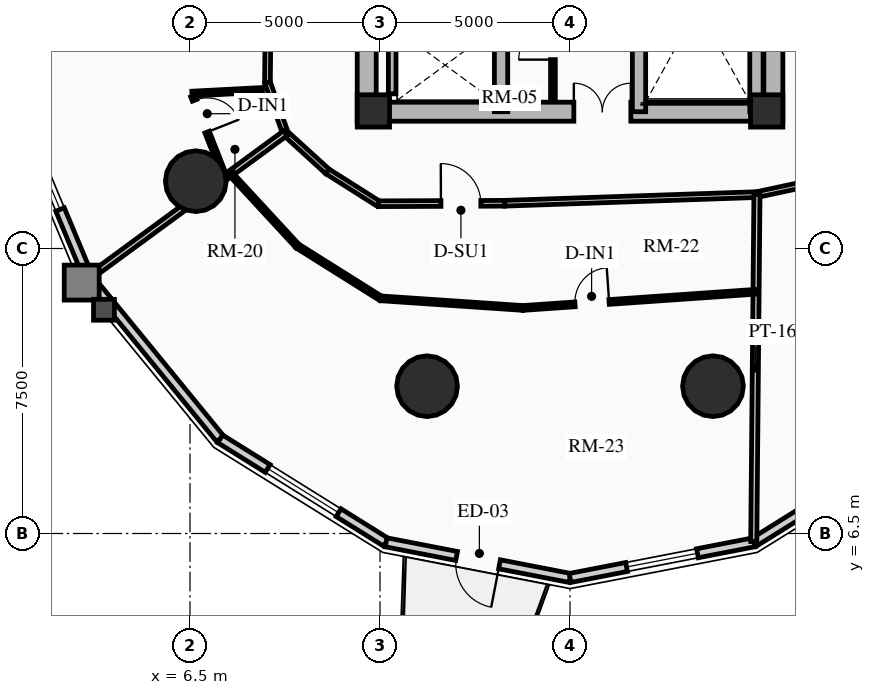
"""IFC4 building model, lengths in metres.
Left out: names, types, materials, properties, quantities, classifications, styles, units other than length and angle.
Written with IfcOpenShell. Run it as: python <this file> out.ifc"""

import sys

from ifc_helpers import new_model, si_unit, direction, frame, frame_2d, origin, origin_2d, place, context, subcontext, project, spatial, rectangle, circle, extrude, source, transform, mapped, element, fill, save


model = new_model("IFC4")
c1 = context("Model", 3, precision=1e-05, world=origin(), true_north=direction((0.0, 1.0)))
c2 = subcontext(c1, "Body", "Model", "MODEL_VIEW")
j1 = project(units=[si_unit("LENGTHUNIT", "METRE"), si_unit("PLANEANGLEUNIT", "RADIAN")], contexts=[c1])
p1 = place(None, origin())
s1 = spatial("IfcSite", under=j1, at=p1, CompositionType="ELEMENT")
p2 = place(p1, origin())
s2 = spatial("IfcBuilding", under=s1, at=p2, CompositionType="ELEMENT")
p3 = place(p2, frame((0.0, 0.0, 48.19)))
s3 = spatial("IfcBuildingStorey", under=s2, at=p3, CompositionType="ELEMENT", Elevation=48.19)
for number, where, z_axis, x_axis in (
    (1, (11.15, 17.35, 0.0), (0.0, 0.0, 1.0), (0.0, 1.0, 0.0)),
    (2, (21.85, 17.35, 0.0), (0.0, 0.0, 1.0), (0.0, 1.0, 0.0)),
):
    element("IfcWall", number, at=place(p3, frame(where, z_axis=z_axis, x_axis=x_axis)), inside=s3, PredefinedType="SHEAR", context=c2, shape_type="SweptSolid", body=[
        extrude(rectangle(XDim=14.3, YDim=0.5, at=frame_2d((7.15, 0.0))), origin(), (0.0, 0.0, 1.0), 2.91),
    ])
p4 = place(p3, frame((11.15, 17.6, 0.0), z_axis=(0.0, 0.0, 1.0), x_axis=(1.0, 0.0, 0.0)))
e3 = element("IfcWall", 3, at=p4, inside=s3, PredefinedType="SHEAR", context=c2, shape_type="SweptSolid", body=[
    extrude(rectangle(XDim=10.7, YDim=0.5, at=frame_2d((5.35, 0.0))), origin(), (0.0, 0.0, 1.0), 2.91),
])
m1 = source(origin(), c2, "Body", "SweptSolid", [
    extrude(rectangle(XDim=1.5, YDim=2.02, at=frame_2d((0.75, 1.01))), frame((0.0, 0.26, 0.0), z_axis=(0.0, -1.0, 0.0), x_axis=(1.0, 0.0, 0.0)), (0.0, 0.0, 1.0), 0.52),
])
p5 = place(p4, frame((5.45, 0.0, 0.0)))
e4 = element("IfcOpeningElement", 4, at=p5, cuts=e3, PredefinedType="OPENING", context=c2, shape_type="MappedRepresentation", body=[
    mapped(m1, transform((0.0, 0.0, 0.0), x_axis=(1.0, 0.0, 0.0), y_axis=(0.0, 1.0, 0.0), z_axis=(0.0, 0.0, 1.0), scale=1.0)),
])
p6 = place(p3, frame((14.685, 17.6, 0.0), z_axis=(0.0, 0.0, 1.0), x_axis=(0.0, 1.0, 0.0)))
e5 = element("IfcWall", 5, at=p6, inside=s3, PredefinedType="SHEAR", context=c2, shape_type="SweptSolid", body=[
    extrude(rectangle(XDim=13.8, YDim=0.35, at=frame_2d((6.9, 0.0))), origin(), (0.0, 0.0, 1.0), 2.91),
])
m2 = source(origin(), c2, "Body", "SweptSolid", [
    extrude(rectangle(XDim=1.1, YDim=2.015, at=frame_2d((0.55, 1.007))), frame((0.0, 0.185, 0.0), z_axis=(0.0, -1.0, 0.0), x_axis=(1.0, 0.0, 0.0)), (0.0, 0.0, 1.0), 0.37),
])
p7 = place(p6, frame((4.9, 0.0, 0.0)))
e6 = element("IfcOpeningElement", 6, at=p7, cuts=e5, PredefinedType="OPENING", context=c2, shape_type="MappedRepresentation", body=[
    mapped(m2, transform((0.0, 0.0, 0.0), x_axis=(1.0, 0.0, 0.0), y_axis=(0.0, 1.0, 0.0), z_axis=(0.0, 0.0, 1.0), scale=1.0)),
])
m3 = source(origin(), c2, "Body", "SweptSolid", [
    extrude(rectangle(XDim=1.15, YDim=2.02, at=frame_2d((0.575, 1.01))), frame((0.0, 0.185, 0.0), z_axis=(0.0, -1.0, 0.0), x_axis=(1.0, 0.0, 0.0)), (0.0, 0.0, 1.0), 0.37),
])
p8 = place(p6, frame((7.32, 0.0, 0.0)))
e7 = element("IfcOpeningElement", 7, at=p8, cuts=e5, PredefinedType="OPENING", context=c2, shape_type="MappedRepresentation", body=[
    mapped(m3, transform((0.0, 0.0, 0.0), x_axis=(1.0, 0.0, 0.0), y_axis=(0.0, 1.0, 0.0), z_axis=(0.0, 0.0, 1.0), scale=1.0)),
])
p9 = place(p3, frame((18.315, 17.6, 0.0), z_axis=(0.0, 0.0, 1.0), x_axis=(0.0, 1.0, 0.0)))
e8 = element("IfcWall", 8, at=p9, inside=s3, PredefinedType="SHEAR", context=c2, shape_type="SweptSolid", body=[
    extrude(rectangle(XDim=13.8, YDim=0.35, at=frame_2d((6.9, 0.0))), origin(), (0.0, 0.0, 1.0), 2.91),
])
p10 = place(p9, frame((10.025, 0.0, 0.0)))
e9 = element("IfcOpeningElement", 9, at=p10, cuts=e8, PredefinedType="OPENING", context=c2, shape_type="MappedRepresentation", body=[
    mapped(m2, transform((0.0, 0.0, 0.0), x_axis=(1.0, 0.0, 0.0), y_axis=(0.0, 1.0, 0.0), z_axis=(0.0, 0.0, 1.0), scale=1.0)),
])
p11 = place(p9, frame((12.025, 0.0, 0.0)))
e10 = element("IfcOpeningElement", 10, at=p11, cuts=e8, PredefinedType="OPENING", context=c2, shape_type="MappedRepresentation", body=[
    mapped(m2, transform((0.0, 0.0, 0.0), x_axis=(1.0, 0.0, 0.0), y_axis=(0.0, 1.0, 0.0), z_axis=(0.0, 0.0, 1.0), scale=1.0)),
])
p12 = place(p9, frame((5.33, 0.0, 0.0)))
e11 = element("IfcOpeningElement", 11, at=p12, cuts=e8, PredefinedType="OPENING", context=c2, shape_type="MappedRepresentation", body=[
    mapped(m3, transform((0.0, 0.0, 0.0), x_axis=(1.0, 0.0, 0.0), y_axis=(0.0, 1.0, 0.0), z_axis=(0.0, 0.0, 1.0), scale=1.0)),
])
p13 = place(p3, frame((21.405, 17.6, 0.0), z_axis=(0.0, 0.0, 1.0), x_axis=(0.0, 1.0, 0.0)))
e12 = element("IfcWall", 12, at=p13, inside=s3, PredefinedType="SHEAR", context=c2, shape_type="SweptSolid", body=[
    extrude(rectangle(XDim=6.745, YDim=0.35, at=frame_2d((3.373, 0.0))), origin(), (0.0, 0.0, 1.0), 2.91),
])
for number, where, z_axis, x_axis in (
    (13, (11.325, 17.62, 0.0), (0.0, 0.0, 1.0), (1.0, 0.0, 0.0)),
    (14, (21.675, 17.62, 0.0), (0.0, 0.0, 1.0), (1.0, 0.0, 0.0)),
):
    element("IfcColumn", number, at=place(p3, frame(where, z_axis=z_axis, x_axis=x_axis)), inside=s3, PredefinedType="COLUMN", context=c2, shape_type="SweptSolid", body=[
        extrude(rectangle(XDim=0.85, YDim=0.85, at=origin_2d()), origin(), (0.0, 0.0, 1.0), 2.91),
    ])
for number, where, z_axis, x_axis in (
    (15, (6.653, 15.771, 0.0), (0.0, 0.0, 1.0), (1.0, 0.0, 0.0)),
    (16, (12.739, 10.377, 0.0), (0.0, 0.0, 1.0), (1.0, 0.0, 0.0)),
    (17, (20.261, 10.377, 0.0), (0.0, 0.0, 1.0), (1.0, 0.0, 0.0)),
):
    element("IfcColumn", number, at=place(p3, frame(where, z_axis=z_axis, x_axis=x_axis)), inside=s3, PredefinedType="USERDEFINED", context=c2, shape_type="SweptSolid", body=[
        extrude(circle(Radius=0.8, at=origin_2d()), origin(), (0.0, 0.0, 1.0), 2.91),
    ])
p14 = place(p3, frame((3.828, 13.232, 0.0), z_axis=(0.0, 0.0, 1.0), x_axis=(-0.384348836956, 0.923187939442, 0.0)))
e18 = element("IfcWall", 18, at=p14, inside=s3, PredefinedType="SOLIDWALL", context=c2, shape_type="SweptSolid", body=[
    extrude(rectangle(XDim=5.789, YDim=0.24, at=frame_2d((2.894, 0.0))), origin(), (0.0, 0.0, 1.0), 2.073),
])
m4 = source(origin(), c2, "Body", "SweptSolid", [
    extrude(rectangle(XDim=1.9, YDim=1.35, at=frame_2d((0.95, 0.675))), frame((0.0, 0.13, 0.0), z_axis=(0.0, -1.0, 0.0), x_axis=(1.0, 0.0, 0.0)), (0.0, 0.0, 1.0), 0.26),
])
p15 = place(p14, frame((1.944, 0.0, 0.65)))
e19 = element("IfcOpeningElement", 19, at=p15, cuts=e18, PredefinedType="OPENING", context=c2, shape_type="MappedRepresentation", body=[
    mapped(m4, transform((0.0, 0.0, 0.0), x_axis=(1.0, 0.0, 0.0), y_axis=(0.0, 1.0, 0.0), z_axis=(0.0, 0.0, 1.0), scale=1.0)),
])
p16 = place(p3, frame((7.293, 8.991, 0.0), z_axis=(0.0, 0.0, 1.0), x_axis=(-0.632713287022, 0.77438614168, 0.0)))
e20 = element("IfcWall", 20, at=p16, inside=s3, PredefinedType="SOLIDWALL", context=c2, shape_type="SweptSolid", body=[
    extrude(rectangle(XDim=5.477, YDim=0.24, at=frame_2d((2.738, 0.0))), origin(), (0.0, 0.0, 1.0), 2.073),
])
p17 = place(p3, frame((11.66, 6.268, 0.0), z_axis=(0.0, 0.0, 1.0), x_axis=(-0.848533613342, 0.529141481107, 0.0)))
e21 = element("IfcWall", 21, at=p17, inside=s3, PredefinedType="SOLIDWALL", context=c2, shape_type="SweptSolid", body=[
    extrude(rectangle(XDim=5.146, YDim=0.24, at=frame_2d((2.573, 0.0))), origin(), (0.0, 0.0, 1.0), 2.073),
])
m5 = source(origin(), c2, "Body", "SweptSolid", [
    extrude(rectangle(XDim=2.2, YDim=1.35, at=frame_2d((1.1, 0.675))), frame((0.0, 0.13, 0.0), z_axis=(0.0, -1.0, 0.0), x_axis=(1.0, 0.0, 0.0)), (0.0, 0.0, 1.0), 0.26),
])
p18 = place(p17, frame((1.473, 0.0, 0.65)))
e22 = element("IfcOpeningElement", 22, at=p18, cuts=e21, PredefinedType="OPENING", context=c2, shape_type="MappedRepresentation", body=[
    mapped(m5, transform((0.0, 0.0, 0.0), x_axis=(1.0, 0.0, 0.0), y_axis=(0.0, 1.0, 0.0), z_axis=(0.0, 0.0, 1.0), scale=1.0)),
])
p19 = place(p3, frame((16.5, 5.33, 0.0), z_axis=(0.0, 0.0, 1.0), x_axis=(-0.981725274071, 0.190303668512, 0.0)))
e23 = element("IfcWall", 23, at=p19, inside=s3, PredefinedType="SOLIDWALL", context=c2, shape_type="SweptSolid", body=[
    extrude(rectangle(XDim=4.93, YDim=0.24, at=frame_2d((2.465, 0.0))), origin(), (0.0, 0.0, 1.0), 2.073),
])
m6 = source(origin(), c2, "Body", "SweptSolid", [
    extrude(rectangle(XDim=1.15, YDim=2.005, at=frame_2d((0.575, 1.002))), frame((0.0, 0.13, 0.0), z_axis=(0.0, -1.0, 0.0), x_axis=(1.0, 0.0, 0.0)), (0.0, 0.0, 1.0), 0.26),
])
p20 = place(p19, frame((1.89, 0.0, 0.0)))
e24 = element("IfcOpeningElement", 24, at=p20, cuts=e23, PredefinedType="OPENING", context=c2, shape_type="MappedRepresentation", body=[
    mapped(m6, transform((0.0, 0.0, 0.0), x_axis=(1.0, 0.0, 0.0), y_axis=(0.0, 1.0, 0.0), z_axis=(0.0, 0.0, 1.0), scale=1.0)),
])
p21 = place(p3, frame((21.34, 6.268, 0.0), z_axis=(0.0, 0.0, 1.0), x_axis=(-0.981725274071, -0.190303668512, 0.0)))
e25 = element("IfcWall", 25, at=p21, inside=s3, PredefinedType="SOLIDWALL", context=c2, shape_type="SweptSolid", body=[
    extrude(rectangle(XDim=4.93, YDim=0.24, at=frame_2d((2.465, 0.0))), origin(), (0.0, 0.0, 1.0), 2.073),
])
p22 = place(p21, frame((1.515, 0.0, 0.65)))
e26 = element("IfcOpeningElement", 26, at=p22, cuts=e25, PredefinedType="OPENING", context=c2, shape_type="MappedRepresentation", body=[
    mapped(m4, transform((0.0, 0.0, 0.0), x_axis=(1.0, 0.0, 0.0), y_axis=(0.0, 1.0, 0.0), z_axis=(0.0, 0.0, 1.0), scale=1.0)),
])
p23 = place(p3, frame((25.707, 8.991, 0.0), z_axis=(0.0, 0.0, 1.0), x_axis=(-0.848533613342, -0.529141481107, 0.0)))
e27 = element("IfcWall", 27, at=p23, inside=s3, PredefinedType="SOLIDWALL", context=c2, shape_type="SweptSolid", body=[
    extrude(rectangle(XDim=5.146, YDim=0.24, at=frame_2d((2.573, 0.0))), origin(), (0.0, 0.0, 1.0), 2.073),
])
p24 = place(p3, frame((11.82, 18.07, 0.0), z_axis=(0.0, 0.0, 1.0), x_axis=(0.0, 1.0, 0.0)))
e28 = element("IfcWall", 28, at=p24, inside=s3, PredefinedType="SHEAR", context=c2, shape_type="SweptSolid", body=[
    extrude(rectangle(XDim=1.635, YDim=0.2, at=frame_2d((0.817, 0.0))), origin(), (0.0, 0.0, 1.0), 2.91),
])
p25 = place(p3, frame((16.05, 17.92, 0.0), z_axis=(0.0, 0.0, 1.0), x_axis=(0.0, 1.0, 0.0)))
e29 = element("IfcWall", 29, at=p25, inside=s3, PredefinedType="PARTITIONING", context=c2, shape_type="SweptSolid", body=[
    extrude(rectangle(XDim=3.08, YDim=0.125, at=frame_2d((1.54, 0.0))), origin(), (0.0, 0.0, 1.0), 2.635),
])
m7 = source(origin(), c2, "Body", "SweptSolid", [
    extrude(rectangle(XDim=0.9, YDim=2.005, at=frame_2d((0.45, 1.002))), frame((0.0, 0.073, 0.0), z_axis=(0.0, -1.0, 0.0), x_axis=(1.0, 0.0, 0.0)), (0.0, 0.0, 1.0), 0.145),
])
p26 = place(p25, frame((1.05, 0.0, 0.0)))
e30 = element("IfcOpeningElement", 30, at=p26, cuts=e29, PredefinedType="OPENING", context=c2, shape_type="MappedRepresentation", body=[
    mapped(m7, transform((0.0, 0.0, 0.0), x_axis=(1.0, 0.0, 0.0), y_axis=(0.0, 1.0, 0.0), z_axis=(0.0, 0.0, 1.0), scale=1.0)),
])
p27 = place(p3, frame((8.6, 24.5, 0.0), z_axis=(0.0, 0.0, 1.0), x_axis=(-0.010076760723, -0.999949228158, 0.0)))
e31 = element("IfcWall", 31, at=p27, inside=s3, PredefinedType="PARTITIONING", context=c2, shape_type="SweptSolid", body=[
    extrude(rectangle(XDim=6.13, YDim=0.15, at=frame_2d((3.065, 0.0))), origin(), (0.0, 0.0, 1.0), 2.159),
])
m8 = source(origin(), c2, "Body", "SweptSolid", [
    extrude(rectangle(XDim=1.05, YDim=2.015, at=frame_2d((0.525, 1.007))), frame((0.0, 0.085, 0.0), z_axis=(0.0, -1.0, 0.0), x_axis=(1.0, 0.0, 0.0)), (0.0, 0.0, 1.0), 0.17),
])
p28 = place(p27, frame((2.54, 0.0, 0.0)))
e32 = element("IfcOpeningElement", 32, at=p28, cuts=e31, PredefinedType="OPENING", context=c2, shape_type="MappedRepresentation", body=[
    mapped(m8, transform((0.0, 0.0, 0.0), x_axis=(1.0, 0.0, 0.0), y_axis=(0.0, 1.0, 0.0), z_axis=(0.0, 0.0, 1.0), scale=1.0)),
])
p29 = place(p3, frame((8.538, 18.371, 0.0), z_axis=(0.0, 0.0, 1.0), x_axis=(0.3330273821, -0.942917155837, 0.0)))
e33 = element("IfcWall", 33, at=p29, inside=s3, PredefinedType="PARTITIONING", context=c2, shape_type="SweptSolid", body=[
    extrude(rectangle(XDim=1.417, YDim=0.15, at=frame_2d((0.708, 0.0))), origin(), (0.0, 0.0, 1.0), 2.205),
])
p30 = place(p3, frame((9.01, 17.034, 0.0), z_axis=(0.0, 0.0, 1.0), x_axis=(0.739733009791, -0.672900493554, 0.0)))
e34 = element("IfcWall", 34, at=p30, inside=s3, PredefinedType="PARTITIONING", context=c2, shape_type="SweptSolid", body=[
    extrude(rectangle(XDim=1.494, YDim=0.15, at=frame_2d((0.747, 0.0))), origin(), (0.0, 0.0, 1.0), 2.159),
])
p31 = place(p3, frame((10.115, 16.029, 0.0), z_axis=(0.0, 0.0, 1.0), x_axis=(0.844897677802, -0.534927952201, 0.0)))
e35 = element("IfcWall", 35, at=p31, inside=s3, PredefinedType="PARTITIONING", context=c2, shape_type="SweptSolid", body=[
    extrude(rectangle(XDim=1.591, YDim=0.15, at=frame_2d((0.795, 0.0))), origin(), (0.0, 0.0, 1.0), 2.205),
])
p32 = place(p3, frame((11.46, 15.178, 0.0), z_axis=(0.0, 0.0, 1.0), x_axis=(0.999992694689, 0.003822377251, 0.0)))
e36 = element("IfcWall", 36, at=p32, inside=s3, PredefinedType="PARTITIONING", context=c2, shape_type="SweptSolid", body=[
    extrude(rectangle(XDim=3.321, YDim=0.15, at=frame_2d((1.661, 0.0))), origin(), (0.0, 0.0, 1.0), 2.159),
])
p33 = place(p32, frame((1.643, 0.0, 0.0)))
e37 = element("IfcOpeningElement", 37, at=p33, cuts=e36, PredefinedType="OPENING", context=c2, shape_type="MappedRepresentation", body=[
    mapped(m8, transform((0.0, 0.0, 0.0), x_axis=(1.0, 0.0, 0.0), y_axis=(0.0, 1.0, 0.0), z_axis=(0.0, 0.0, 1.0), scale=1.0)),
])
p34 = place(p3, frame((14.781, 15.191, 0.0), z_axis=(0.0, 0.0, 1.0), x_axis=(0.999412963972, 0.034259705842, 0.0)))
e38 = element("IfcWall", 38, at=p34, inside=s3, PredefinedType="PARTITIONING", context=c2, shape_type="SweptSolid", body=[
    extrude(rectangle(XDim=6.642, YDim=0.15, at=frame_2d((3.321, 0.0))), origin(), (0.0, 0.0, 1.0), 2.159),
])
p35 = place(p3, frame((21.419, 15.418, 0.0), z_axis=(0.0, 0.0, 1.0), x_axis=(0.977540384091, 0.210748184977, 0.0)))
e39 = element("IfcWall", 39, at=p35, inside=s3, PredefinedType="PARTITIONING", context=c2, shape_type="SweptSolid", body=[
    extrude(rectangle(XDim=1.887, YDim=0.15, at=frame_2d((0.944, 0.0))), origin(), (0.0, 0.0, 1.0), 2.205),
])
p36 = place(p3, frame((9.01, 17.034, 0.0), z_axis=(0.0, 0.0, 1.0), x_axis=(-0.806234156757, -0.591596555499, 0.0)))
e40 = element("IfcWall", 40, at=p36, inside=s3, PredefinedType="PARTITIONING", context=c2, shape_type="SweptSolid", body=[
    extrude(rectangle(XDim=6.407, YDim=0.16, at=frame_2d((3.204, 0.0))), origin(), (0.0, 0.0, 1.0), 2.073),
])
p37 = place(p3, frame((21.419, 15.418, 0.0), z_axis=(0.0, 0.0, 1.0), x_axis=(-0.009277675551, -0.999956961442, 0.0)))
e41 = element("IfcWall", 41, at=p37, inside=s3, PredefinedType="PARTITIONING", context=c2, shape_type="SweptSolid", body=[
    extrude(rectangle(XDim=9.131, YDim=0.16, at=frame_2d((4.566, 0.0))), origin(), (0.0, 0.0, 1.0), 2.073),
])
p38 = place(p3, frame((8.404, 18.173, 0.0), z_axis=(0.0, 0.0, 1.0), x_axis=(-0.998640999178, -0.052116741655, 0.0)))
e42 = element("IfcWall", 42, at=p38, inside=s3, PredefinedType="PARTITIONING", context=c2, shape_type="SweptSolid", body=[
    extrude(rectangle(XDim=1.855, YDim=0.125, at=frame_2d((0.927, 0.0))), origin(), (0.0, 0.0, 1.0), 2.205),
])
p39 = place(p3, frame((6.577, 18.012, 0.0), z_axis=(0.0, 0.0, 1.0), x_axis=(0.366179258149, -0.930544330433, 0.0)))
e43 = element("IfcWall", 43, at=p39, inside=s3, PredefinedType="PARTITIONING", context=c2, shape_type="SweptSolid", body=[
    extrude(rectangle(XDim=2.208, YDim=0.125, at=frame_2d((1.104, 0.0))), origin(), (0.0, 0.0, 1.0), 2.159),
])
p40 = place(p39, frame((0.12, 0.0, 0.0)))
e44 = element("IfcOpeningElement", 44, at=p40, cuts=e43, PredefinedType="OPENING", context=c2, shape_type="MappedRepresentation", body=[
    mapped(m7, transform((0.0, 0.0, 0.0), x_axis=(1.0, 0.0, 0.0), y_axis=(0.0, 1.0, 0.0), z_axis=(0.0, 0.0, 1.0), scale=1.0)),
])
p41 = place(p3, frame((7.564, 15.973, 0.0), z_axis=(0.0, 0.0, 1.0), x_axis=(0.678576389573, -0.734529838409, 0.0)))
e45 = element("IfcWall", 45, at=p41, inside=s3, PredefinedType="PARTITIONING", context=c2, shape_type="SweptSolid", body=[
    extrude(rectangle(XDim=2.601, YDim=0.125, at=frame_2d((1.3, 0.0))), origin(), (0.0, 0.0, 1.0), 2.635),
])
p42 = place(p3, frame((9.329, 14.063, 0.0), z_axis=(0.0, 0.0, 1.0), x_axis=(0.846882074778, -0.531780736225, 0.0)))
e46 = element("IfcWall", 46, at=p42, inside=s3, PredefinedType="PARTITIONING", context=c2, shape_type="SweptSolid", body=[
    extrude(rectangle(XDim=2.585, YDim=0.125, at=frame_2d((1.292, 0.0))), origin(), (0.0, 0.0, 1.0), 2.205),
])
p43 = place(p3, frame((11.518, 12.688, 0.0), z_axis=(0.0, 0.0, 1.0), x_axis=(0.997722259414, -0.067455860152, 0.0)))
e47 = element("IfcWall", 47, at=p43, inside=s3, PredefinedType="PARTITIONING", context=c2, shape_type="SweptSolid", body=[
    extrude(rectangle(XDim=3.753, YDim=0.125, at=frame_2d((1.876, 0.0))), origin(), (0.0, 0.0, 1.0), 2.159),
])
p44 = place(p3, frame((15.262, 12.435, 0.0), z_axis=(0.0, 0.0, 1.0), x_axis=(0.997593149667, 0.069339077998, 0.0)))
e48 = element("IfcWall", 48, at=p44, inside=s3, PredefinedType="PARTITIONING", context=c2, shape_type="SweptSolid", body=[
    extrude(rectangle(XDim=6.148, YDim=0.125, at=frame_2d((3.074, 0.0))), origin(), (0.0, 0.0, 1.0), 2.159),
])
p45 = place(p44, frame((1.372, 0.0, 0.0)))
e49 = element("IfcOpeningElement", 49, at=p45, cuts=e48, PredefinedType="OPENING", context=c2, shape_type="MappedRepresentation", body=[
    mapped(m7, transform((0.0, 0.0, 0.0), x_axis=(1.0, 0.0, 0.0), y_axis=(0.0, 1.0, 0.0), z_axis=(0.0, 0.0, 1.0), scale=1.0)),
])
m9 = source(origin(), c2, "Body", "SweptSolid", [
    extrude(rectangle(XDim=1.9, YDim=1.35, at=frame_2d((0.95, 0.675))), frame((0.0, 0.03, 0.0), z_axis=(0.0, -1.0, 0.0), x_axis=(1.0, 0.0, 0.0)), (0.0, 0.0, 1.0), 0.06),
])
p46 = place(p15, origin())
e50 = element("IfcWindow", 50, at=p46, inside=s3, PartitioningType="DOUBLE_PANEL_VERTICAL", PredefinedType="WINDOW", context=c2, shape_type="MappedRepresentation", body=[
    mapped(m9, transform((0.0, 0.0, 0.0), x_axis=(1.0, 0.0, 0.0), y_axis=(0.0, 1.0, 0.0), z_axis=(0.0, 0.0, 1.0), scale=1.0)),
])
fill(e19, e50)
m10 = source(origin(), c2, "Body", "SweptSolid", [
    extrude(rectangle(XDim=2.2, YDim=1.35, at=frame_2d((1.1, 0.675))), frame((0.0, 0.03, 0.0), z_axis=(0.0, -1.0, 0.0), x_axis=(1.0, 0.0, 0.0)), (0.0, 0.0, 1.0), 0.06),
])
p47 = place(p18, origin())
e51 = element("IfcWindow", 51, at=p47, inside=s3, PartitioningType="DOUBLE_PANEL_VERTICAL", PredefinedType="WINDOW", context=c2, shape_type="MappedRepresentation", body=[
    mapped(m10, transform((0.0, 0.0, 0.0), x_axis=(1.0, 0.0, 0.0), y_axis=(0.0, 1.0, 0.0), z_axis=(0.0, 0.0, 1.0), scale=1.0)),
])
fill(e22, e51)
m11 = source(origin(), c2, "Body", "SweptSolid", [
    extrude(rectangle(XDim=1.15, YDim=2.005, at=frame_2d((0.575, 1.002))), frame((0.0, 0.025, 0.0), z_axis=(0.0, -1.0, 0.0), x_axis=(1.0, 0.0, 0.0)), (0.0, 0.0, 1.0), 0.05),
])
p48 = place(p20, origin())
e52 = element("IfcDoor", 52, at=p48, inside=s3, OperationType="SINGLE_SWING_LEFT", PredefinedType="DOOR", context=c2, shape_type="MappedRepresentation", body=[
    mapped(m11, transform((0.0, 0.0, 0.0), x_axis=(1.0, 0.0, 0.0), y_axis=(0.0, 1.0, 0.0), z_axis=(0.0, 0.0, 1.0), scale=1.0)),
])
fill(e24, e52)
p49 = place(p22, origin())
e53 = element("IfcWindow", 53, at=p49, inside=s3, PartitioningType="DOUBLE_PANEL_VERTICAL", PredefinedType="WINDOW", context=c2, shape_type="MappedRepresentation", body=[
    mapped(m9, transform((0.0, 0.0, 0.0), x_axis=(1.0, 0.0, 0.0), y_axis=(0.0, 1.0, 0.0), z_axis=(0.0, 0.0, 1.0), scale=1.0)),
])
fill(e26, e53)
m12 = source(origin(), c2, "Body", "SweptSolid", [
    extrude(rectangle(XDim=1.5, YDim=2.02, at=frame_2d((0.75, 1.01))), frame((0.0, 0.025, 0.0), z_axis=(0.0, -1.0, 0.0), x_axis=(1.0, 0.0, 0.0)), (0.0, 0.0, 1.0), 0.05),
])
p50 = place(p5, origin())
e54 = element("IfcDoor", 54, at=p50, inside=s3, OperationType="DOUBLE_DOOR_SINGLE_SWING", PredefinedType="DOOR", context=c2, shape_type="MappedRepresentation", body=[
    mapped(m12, transform((0.0, 0.0, 0.0), x_axis=(1.0, 0.0, 0.0), y_axis=(0.0, 1.0, 0.0), z_axis=(0.0, 0.0, 1.0), scale=1.0)),
])
fill(e4, e54)
m13 = source(origin(), c2, "Body", "SweptSolid", [
    extrude(rectangle(XDim=0.9, YDim=2.005, at=frame_2d((0.45, 1.002))), frame((0.0, 0.025, 0.0), z_axis=(0.0, -1.0, 0.0), x_axis=(1.0, 0.0, 0.0)), (0.0, 0.0, 1.0), 0.05),
])
p51 = place(p26, origin())
e55 = element("IfcDoor", 55, at=p51, inside=s3, OperationType="SINGLE_SWING_LEFT", PredefinedType="DOOR", context=c2, shape_type="MappedRepresentation", body=[
    mapped(m13, transform((0.0, 0.0, 0.0), x_axis=(1.0, 0.0, 0.0), y_axis=(0.0, 1.0, 0.0), z_axis=(0.0, 0.0, 1.0), scale=1.0)),
])
fill(e30, e55)
p52 = place(p40, origin())
e56 = element("IfcDoor", 56, at=p52, inside=s3, OperationType="SINGLE_SWING_RIGHT", PredefinedType="DOOR", context=c2, shape_type="MappedRepresentation", body=[
    mapped(m13, transform((0.0, 0.0, 0.0), x_axis=(1.0, 0.0, 0.0), y_axis=(0.0, 1.0, 0.0), z_axis=(0.0, 0.0, 1.0), scale=1.0)),
])
fill(e44, e56)
m14 = source(origin(), c2, "Body", "SweptSolid", [
    extrude(rectangle(XDim=1.05, YDim=2.015, at=frame_2d((0.525, 1.007))), frame((0.0, 0.025, 0.0), z_axis=(0.0, -1.0, 0.0), x_axis=(1.0, 0.0, 0.0)), (0.0, 0.0, 1.0), 0.05),
])
p53 = place(p33, origin())
e57 = element("IfcDoor", 57, at=p53, inside=s3, OperationType="SINGLE_SWING_LEFT", PredefinedType="DOOR", context=c2, shape_type="MappedRepresentation", body=[
    mapped(m14, transform((0.0, 0.0, 0.0), x_axis=(1.0, 0.0, 0.0), y_axis=(0.0, 1.0, 0.0), z_axis=(0.0, 0.0, 1.0), scale=1.0)),
])
fill(e37, e57)
p54 = place(p45, origin())
e58 = element("IfcDoor", 58, at=p54, inside=s3, OperationType="SINGLE_SWING_RIGHT", PredefinedType="DOOR", context=c2, shape_type="MappedRepresentation", body=[
    mapped(m13, transform((0.0, 0.0, 0.0), x_axis=(1.0, 0.0, 0.0), y_axis=(0.0, 1.0, 0.0), z_axis=(0.0, 0.0, 1.0), scale=1.0)),
])
fill(e49, e58)
save(model, sys.argv[1])
